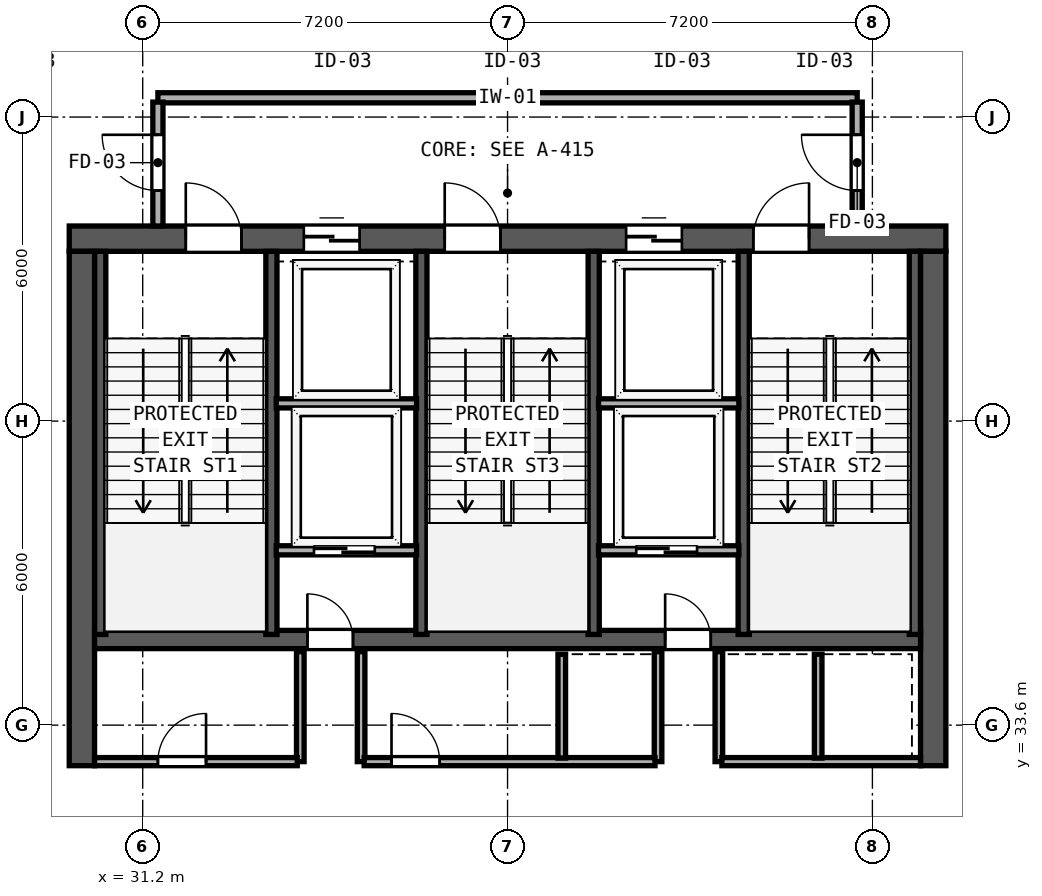
"""IFC4 building model, lengths in metres.
Left out: names, types, materials, properties, quantities, classifications, styles, units other than length and angle.
Written with IfcOpenShell. Run it as: python <this file> out.ifc"""

import sys

from ifc_helpers import new_model, si_unit, direction, frame, frame_2d, origin, place, context, subcontext, project, spatial, rectangle, extrude, element, fill, save


model = new_model("IFC4")
c1 = context("Model", 3, precision=1e-05, world=origin(), true_north=direction((0.0, 1.0)))
c2 = subcontext(c1, "Body", "Model", "MODEL_VIEW")
j1 = project(units=[si_unit("LENGTHUNIT", "METRE"), si_unit("PLANEANGLEUNIT", "RADIAN")], contexts=[c1])
p1 = place(None, origin())
s1 = spatial("IfcSite", under=j1, at=p1, CompositionType="ELEMENT")
p2 = place(p1, origin())
s2 = spatial("IfcBuilding", under=s1, at=p2, CompositionType="ELEMENT")
p3 = place(p2, frame((0.0, 0.0, 313.4)))
s3 = spatial("IfcBuildingStorey", under=s2, at=p3, CompositionType="ELEMENT", Elevation=313.4)
p4 = place(p3, frame((29.75, 43.2, 0.0), z_axis=(0.0, 0.0, 1.0), x_axis=(1.0, 0.0, 0.0)))
e1 = element("IfcWall", 1, at=p4, inside=s3, PredefinedType="SHEAR", context=c2, shape_type="SweptSolid", body=[
    extrude(rectangle(XDim=17.3, YDim=0.5, at=frame_2d((8.65, 0.0))), origin(), (0.0, 0.0, 1.0), 4.56),
])
p5 = place(p4, frame((2.3, 0.0, 0.0)))
e2 = element("IfcOpeningElement", 2, at=p5, cuts=e1, PredefinedType="OPENING", context=c2, shape_type="SweptSolid", body=[
    extrude(rectangle(XDim=1.1, YDim=2.15, at=frame_2d((0.55, 1.075))), frame((0.0, 0.26, 0.0), z_axis=(0.0, -1.0, 0.0), x_axis=(1.0, 0.0, 0.0)), (0.0, 0.0, 1.0), 0.52),
])
p6 = place(p4, frame((7.41, 0.0, 0.0)))
e3 = element("IfcOpeningElement", 3, at=p6, cuts=e1, PredefinedType="OPENING", context=c2, shape_type="SweptSolid", body=[
    extrude(rectangle(XDim=1.1, YDim=2.15, at=frame_2d((0.55, 1.075))), frame((0.0, 0.26, 0.0), z_axis=(0.0, -1.0, 0.0), x_axis=(1.0, 0.0, 0.0)), (0.0, 0.0, 1.0), 0.52),
])
p7 = place(p4, frame((13.5, 0.0, 0.0)))
e4 = element("IfcOpeningElement", 4, at=p7, cuts=e1, PredefinedType="OPENING", context=c2, shape_type="SweptSolid", body=[
    extrude(rectangle(XDim=1.1, YDim=2.15, at=frame_2d((0.55, 1.075))), frame((0.0, 0.26, 0.0), z_axis=(0.0, -1.0, 0.0), x_axis=(1.0, 0.0, 0.0)), (0.0, 0.0, 1.0), 0.52),
])
p8 = place(p4, frame((4.63, 0.0, 0.0)))
e5 = element("IfcOpeningElement", 5, at=p8, cuts=e1, PredefinedType="OPENING", context=c2, shape_type="SweptSolid", body=[
    extrude(rectangle(XDim=1.1, YDim=2.2, at=frame_2d((0.55, 1.1))), frame((0.0, 0.26, 0.0), z_axis=(0.0, -1.0, 0.0), x_axis=(1.0, 0.0, 0.0)), (0.0, 0.0, 1.0), 0.52),
])
p9 = place(p4, frame((10.99, 0.0, 0.0)))
e6 = element("IfcOpeningElement", 6, at=p9, cuts=e1, PredefinedType="OPENING", context=c2, shape_type="SweptSolid", body=[
    extrude(rectangle(XDim=1.1, YDim=2.2, at=frame_2d((0.55, 1.1))), frame((0.0, 0.26, 0.0), z_axis=(0.0, -1.0, 0.0), x_axis=(1.0, 0.0, 0.0)), (0.0, 0.0, 1.0), 0.52),
])
for number, where, z_axis, x_axis in (
    (7, (30.0, 32.8, 0.0), (0.0, 0.0, 1.0), (0.0, 1.0, 0.0)),
    (8, (46.8, 32.8, 0.0), (0.0, 0.0, 1.0), (0.0, 1.0, 0.0)),
):
    element("IfcWall", number, at=place(p3, frame(where, z_axis=z_axis, x_axis=x_axis)), inside=s3, PredefinedType="SHEAR", context=c2, shape_type="SweptSolid", body=[
        extrude(rectangle(XDim=10.15, YDim=0.5, at=frame_2d((5.075, 0.0))), origin(), (0.0, 0.0, 1.0), 4.56),
    ])
p10 = place(p3, frame((30.25, 35.29, 0.0), z_axis=(0.0, 0.0, 1.0), x_axis=(1.0, 0.0, 0.0)))
e9 = element("IfcWall", 9, at=p10, inside=s3, PredefinedType="SHEAR", context=c2, shape_type="SweptSolid", body=[
    extrude(rectangle(XDim=16.3, YDim=0.36, at=frame_2d((8.15, 0.0))), origin(), (0.0, 0.0, 1.0), 4.56),
])
p11 = place(p10, frame((5.1, 0.0, 0.0), z_axis=(0.0, 0.0, 1.0), x_axis=(-1.0, 0.0, 0.0)))
e10 = element("IfcOpeningElement", 10, at=p11, cuts=e9, PredefinedType="OPENING", context=c2, shape_type="SweptSolid", body=[
    extrude(rectangle(XDim=0.9, YDim=2.1, at=frame_2d((0.45, 1.05))), frame((0.0, 0.19, 0.0), z_axis=(0.0, -1.0, 0.0), x_axis=(1.0, 0.0, 0.0)), (0.0, 0.0, 1.0), 0.38),
])
p12 = place(p10, frame((12.16, 0.0, 0.0), z_axis=(0.0, 0.0, 1.0), x_axis=(-1.0, 0.0, 0.0)))
e11 = element("IfcOpeningElement", 11, at=p12, cuts=e9, PredefinedType="OPENING", context=c2, shape_type="SweptSolid", body=[
    extrude(rectangle(XDim=0.9, YDim=2.1, at=frame_2d((0.45, 1.05))), frame((0.0, 0.19, 0.0), z_axis=(0.0, -1.0, 0.0), x_axis=(1.0, 0.0, 0.0)), (0.0, 0.0, 1.0), 0.38),
])
for number, where, z_axis, x_axis in (
    (12, (30.362, 35.39, 0.0), (0.0, 0.0, 1.0), (0.0, 1.0, 0.0)),
    (13, (33.74, 35.39, 0.0), (0.0, 0.0, 1.0), (0.0, 1.0, 0.0)),
    (14, (36.7, 35.39, 0.0), (0.0, 0.0, 1.0), (0.0, 1.0, 0.0)),
    (15, (40.1, 35.39, 0.0), (0.0, 0.0, 1.0), (0.0, 1.0, 0.0)),
    (16, (43.06, 35.39, 0.0), (0.0, 0.0, 1.0), (0.0, 1.0, 0.0)),
    (17, (46.438, 35.39, 0.0), (0.0, 0.0, 1.0), (0.0, 1.0, 0.0)),
):
    element("IfcWall", number, at=place(p3, frame(where, z_axis=z_axis, x_axis=x_axis)), inside=s3, PredefinedType="SHEAR", context=c2, shape_type="SweptSolid", body=[
        extrude(rectangle(XDim=7.56, YDim=0.22, at=frame_2d((3.78, 0.0))), origin(), (0.0, 0.0, 1.0), 4.56),
    ])
p13 = place(p3, frame((31.5, 45.98, 0.0), z_axis=(0.0, 0.0, 1.0), x_axis=(1.0, 0.0, 0.0)))
e18 = element("IfcWall", 18, at=p13, inside=s3, PredefinedType="SOLIDWALL", context=c2, shape_type="SweptSolid", body=[
    extrude(rectangle(XDim=13.8, YDim=0.2, at=frame_2d((6.9, 0.0))), origin(), (0.0, 0.0, 1.0), 4.56),
])
p14 = place(p3, frame((31.5, 43.45, 0.0), z_axis=(0.0, 0.0, 1.0), x_axis=(0.0, 1.0, 0.0)))
e19 = element("IfcWall", 19, at=p14, inside=s3, PredefinedType="SOLIDWALL", context=c2, shape_type="SweptSolid", body=[
    extrude(rectangle(XDim=2.445, YDim=0.2, at=frame_2d((1.223, 0.0))), origin(), (0.0, 0.0, 1.0), 4.56),
])
p15 = place(p14, frame((1.8, 0.0, 0.0), z_axis=(0.0, 0.0, 1.0), x_axis=(-1.0, 0.0, 0.0)))
e20 = element("IfcOpeningElement", 20, at=p15, cuts=e19, PredefinedType="OPENING", context=c2, shape_type="SweptSolid", body=[
    extrude(rectangle(XDim=1.1, YDim=2.15, at=frame_2d((0.55, 1.075))), frame((0.0, 0.11, 0.0), z_axis=(0.0, -1.0, 0.0), x_axis=(1.0, 0.0, 0.0)), (0.0, 0.0, 1.0), 0.22),
])
p16 = place(p3, frame((45.3, 43.45, 0.0), z_axis=(0.0, 0.0, 1.0), x_axis=(0.0, 1.0, 0.0)))
e21 = element("IfcWall", 21, at=p16, inside=s3, PredefinedType="SOLIDWALL", context=c2, shape_type="SweptSolid", body=[
    extrude(rectangle(XDim=2.445, YDim=0.2, at=frame_2d((1.223, 0.0))), origin(), (0.0, 0.0, 1.0), 4.56),
])
p17 = place(p16, frame((0.7, 0.0, 0.0)))
e22 = element("IfcOpeningElement", 22, at=p17, cuts=e21, PredefinedType="OPENING", context=c2, shape_type="SweptSolid", body=[
    extrude(rectangle(XDim=1.1, YDim=2.15, at=frame_2d((0.55, 1.075))), frame((0.0, 0.11, 0.0), z_axis=(0.0, -1.0, 0.0), x_axis=(1.0, 0.0, 0.0)), (0.0, 0.0, 1.0), 0.22),
])
for number, where, z_axis, x_axis in (
    (23, (33.835, 39.95, 0.0), (0.0, 0.0, 1.0), (1.0, 0.0, 0.0)),
    (24, (40.195, 39.95, 0.0), (0.0, 0.0, 1.0), (1.0, 0.0, 0.0)),
):
    element("IfcWall", number, at=place(p3, frame(where, z_axis=z_axis, x_axis=x_axis)), inside=s3, PredefinedType="SOLIDWALL", context=c2, shape_type="SweptSolid", body=[
        extrude(rectangle(XDim=2.77, YDim=0.18, at=frame_2d((1.385, 0.0))), origin(), (0.0, 0.0, 1.0), 4.56),
    ])
p18 = place(p3, frame((33.835, 37.05, 0.0), z_axis=(0.0, 0.0, 1.0), x_axis=(1.0, 0.0, 0.0)))
e25 = element("IfcWall", 25, at=p18, inside=s3, PredefinedType="SOLIDWALL", context=c2, shape_type="SweptSolid", body=[
    extrude(rectangle(XDim=2.77, YDim=0.18, at=frame_2d((1.385, 0.0))), origin(), (0.0, 0.0, 1.0), 4.56),
])
p19 = place(p18, frame((1.945, 0.0, 0.0), z_axis=(0.0, 0.0, 1.0), x_axis=(-1.0, 0.0, 0.0)))
e26 = element("IfcOpeningElement", 26, at=p19, cuts=e25, PredefinedType="OPENING", context=c2, shape_type="SweptSolid", body=[
    extrude(rectangle(XDim=1.2, YDim=2.2, at=frame_2d((0.6, 1.1))), frame((0.0, 0.1, 0.0), z_axis=(0.0, -1.0, 0.0), x_axis=(1.0, 0.0, 0.0)), (0.0, 0.0, 1.0), 0.2),
])
for number, where, z_axis, x_axis in (
    (27, (34.31, 32.88, 0.0), (0.0, 0.0, 1.0), (0.0, 1.0, 0.0)),
    (28, (35.51, 32.88, 0.0), (0.0, 0.0, 1.0), (0.0, 1.0, 0.0)),
):
    element("IfcWall", number, at=place(p3, frame(where, z_axis=z_axis, x_axis=x_axis)), inside=s3, PredefinedType="SOLIDWALL", context=c2, shape_type="SweptSolid", body=[
        extrude(rectangle(XDim=2.17, YDim=0.15, at=frame_2d((1.085, 0.0))), origin(), (0.0, 0.0, 1.0), 4.56),
    ])
p20 = place(p3, frame((40.195, 37.05, 0.0), z_axis=(0.0, 0.0, 1.0), x_axis=(1.0, 0.0, 0.0)))
e29 = element("IfcWall", 29, at=p20, inside=s3, PredefinedType="SOLIDWALL", context=c2, shape_type="SweptSolid", body=[
    extrude(rectangle(XDim=2.77, YDim=0.18, at=frame_2d((1.385, 0.0))), origin(), (0.0, 0.0, 1.0), 4.56),
])
p21 = place(p20, frame((1.945, 0.0, 0.0), z_axis=(0.0, 0.0, 1.0), x_axis=(-1.0, 0.0, 0.0)))
e30 = element("IfcOpeningElement", 30, at=p21, cuts=e29, PredefinedType="OPENING", context=c2, shape_type="SweptSolid", body=[
    extrude(rectangle(XDim=1.2, YDim=2.2, at=frame_2d((0.6, 1.1))), frame((0.0, 0.1, 0.0), z_axis=(0.0, -1.0, 0.0), x_axis=(1.0, 0.0, 0.0)), (0.0, 0.0, 1.0), 0.2),
])
for number, where, z_axis, x_axis in (
    (31, (41.37, 32.88, 0.0), (0.0, 0.0, 1.0), (0.0, 1.0, 0.0)),
    (32, (42.57, 32.88, 0.0), (0.0, 0.0, 1.0), (0.0, 1.0, 0.0)),
):
    element("IfcWall", number, at=place(p3, frame(where, z_axis=z_axis, x_axis=x_axis)), inside=s3, PredefinedType="SOLIDWALL", context=c2, shape_type="SweptSolid", body=[
        extrude(rectangle(XDim=2.17, YDim=0.15, at=frame_2d((1.085, 0.0))), origin(), (0.0, 0.0, 1.0), 4.56),
    ])
p22 = place(p3, frame((30.25, 32.88, 0.0), z_axis=(0.0, 0.0, 1.0), x_axis=(1.0, 0.0, 0.0)))
e33 = element("IfcWall", 33, at=p22, inside=s3, PredefinedType="SOLIDWALL", context=c2, shape_type="SweptSolid", body=[
    extrude(rectangle(XDim=4.0, YDim=0.16, at=frame_2d((2.0, 0.0))), origin(), (0.0, 0.0, 1.0), 4.56),
])
p23 = place(p22, frame((2.2, 0.0, 0.0), z_axis=(0.0, 0.0, 1.0), x_axis=(-1.0, 0.0, 0.0)))
e34 = element("IfcOpeningElement", 34, at=p23, cuts=e33, PredefinedType="OPENING", context=c2, shape_type="SweptSolid", body=[
    extrude(rectangle(XDim=0.95, YDim=2.12, at=frame_2d((0.475, 1.06))), frame((0.0, 0.09, 0.0), z_axis=(0.0, -1.0, 0.0), x_axis=(1.0, 0.0, 0.0)), (0.0, 0.0, 1.0), 0.18),
])
p24 = place(p3, frame((35.57, 32.88, 0.0), z_axis=(0.0, 0.0, 1.0), x_axis=(1.0, 0.0, 0.0)))
e35 = element("IfcWall", 35, at=p24, inside=s3, PredefinedType="SOLIDWALL", context=c2, shape_type="SweptSolid", body=[
    extrude(rectangle(XDim=5.74, YDim=0.16, at=frame_2d((2.87, 0.0))), origin(), (0.0, 0.0, 1.0), 4.56),
])
p25 = place(p24, frame((1.49, 0.0, 0.0), z_axis=(0.0, 0.0, 1.0), x_axis=(-1.0, 0.0, 0.0)))
e36 = element("IfcOpeningElement", 36, at=p25, cuts=e35, PredefinedType="OPENING", context=c2, shape_type="SweptSolid", body=[
    extrude(rectangle(XDim=0.95, YDim=2.12, at=frame_2d((0.475, 1.06))), frame((0.0, 0.09, 0.0), z_axis=(0.0, -1.0, 0.0), x_axis=(1.0, 0.0, 0.0)), (0.0, 0.0, 1.0), 0.18),
])
p26 = place(p3, frame((42.63, 32.88, 0.0), z_axis=(0.0, 0.0, 1.0), x_axis=(1.0, 0.0, 0.0)))
e37 = element("IfcWall", 37, at=p26, inside=s3, PredefinedType="SOLIDWALL", context=c2, shape_type="SweptSolid", body=[
    extrude(rectangle(XDim=3.92, YDim=0.16, at=frame_2d((1.96, 0.0))), origin(), (0.0, 0.0, 1.0), 4.56),
])
for number, where, z_axis, x_axis in (
    (38, (39.47, 32.95, 0.0), (0.0, 0.0, 1.0), (0.0, 1.0, 0.0)),
    (39, (44.53, 32.95, 0.0), (0.0, 0.0, 1.0), (0.0, 1.0, 0.0)),
):
    element("IfcWall", number, at=place(p3, frame(where, z_axis=z_axis, x_axis=x_axis)), inside=s3, PredefinedType="SOLIDWALL", context=c2, shape_type="SweptSolid", body=[
        extrude(rectangle(XDim=2.05, YDim=0.15, at=frame_2d((1.025, 0.0))), origin(), (0.0, 0.0, 1.0), 4.56),
    ])
p27 = place(p5, origin())
e40 = element("IfcDoor", 40, at=p27, inside=s3, OperationType="SINGLE_SWING_LEFT", PredefinedType="DOOR", context=c2, shape_type="SweptSolid", body=[
    extrude(rectangle(XDim=1.1, YDim=2.15, at=frame_2d((0.55, 1.075))), frame((0.0, 0.185, 0.0), z_axis=(0.0, -1.0, 0.0), x_axis=(1.0, 0.0, 0.0)), (0.0, 0.0, 1.0), 0.05),
])
fill(e2, e40)
p28 = place(p6, origin())
e41 = element("IfcDoor", 41, at=p28, inside=s3, OperationType="SINGLE_SWING_LEFT", PredefinedType="DOOR", context=c2, shape_type="SweptSolid", body=[
    extrude(rectangle(XDim=1.1, YDim=2.15, at=frame_2d((0.55, 1.075))), frame((0.0, 0.185, 0.0), z_axis=(0.0, -1.0, 0.0), x_axis=(1.0, 0.0, 0.0)), (0.0, 0.0, 1.0), 0.05),
])
fill(e3, e41)
p29 = place(p7, origin())
e42 = element("IfcDoor", 42, at=p29, inside=s3, OperationType="SINGLE_SWING_RIGHT", PredefinedType="DOOR", context=c2, shape_type="SweptSolid", body=[
    extrude(rectangle(XDim=1.1, YDim=2.15, at=frame_2d((0.55, 1.075))), frame((0.0, 0.185, 0.0), z_axis=(0.0, -1.0, 0.0), x_axis=(1.0, 0.0, 0.0)), (0.0, 0.0, 1.0), 0.05),
])
fill(e4, e42)
p30 = place(p15, origin())
e43 = element("IfcDoor", 43, at=p30, inside=s3, OperationType="SINGLE_SWING_LEFT", PredefinedType="DOOR", context=c2, shape_type="SweptSolid", body=[
    extrude(rectangle(XDim=1.1, YDim=2.15, at=frame_2d((0.55, 1.075))), frame((0.0, 0.025, 0.0), z_axis=(0.0, -1.0, 0.0), x_axis=(1.0, 0.0, 0.0)), (0.0, 0.0, 1.0), 0.05),
])
fill(e20, e43)
p31 = place(p17, origin())
e44 = element("IfcDoor", 44, at=p31, inside=s3, OperationType="SINGLE_SWING_RIGHT", PredefinedType="DOOR", context=c2, shape_type="SweptSolid", body=[
    extrude(rectangle(XDim=1.1, YDim=2.15, at=frame_2d((0.55, 1.075))), frame((0.0, 0.025, 0.0), z_axis=(0.0, -1.0, 0.0), x_axis=(1.0, 0.0, 0.0)), (0.0, 0.0, 1.0), 0.05),
])
fill(e22, e44)
p32 = place(p8, origin())
e45 = element("IfcDoor", 45, at=p32, inside=s3, OperationType="SLIDING_TO_LEFT", PredefinedType="DOOR", context=c2, shape_type="SweptSolid", body=[
    extrude(rectangle(XDim=1.1, YDim=2.2, at=frame_2d((0.55, 1.1))), frame((0.0, 0.185, 0.0), z_axis=(0.0, -1.0, 0.0), x_axis=(1.0, 0.0, 0.0)), (0.0, 0.0, 1.0), 0.05),
])
fill(e5, e45)
p33 = place(p9, origin())
e46 = element("IfcDoor", 46, at=p33, inside=s3, OperationType="SLIDING_TO_LEFT", PredefinedType="DOOR", context=c2, shape_type="SweptSolid", body=[
    extrude(rectangle(XDim=1.1, YDim=2.2, at=frame_2d((0.55, 1.1))), frame((0.0, 0.185, 0.0), z_axis=(0.0, -1.0, 0.0), x_axis=(1.0, 0.0, 0.0)), (0.0, 0.0, 1.0), 0.05),
])
fill(e6, e46)
p34 = place(p19, origin())
e47 = element("IfcDoor", 47, at=p34, inside=s3, OperationType="SLIDING_TO_RIGHT", PredefinedType="DOOR", context=c2, shape_type="SweptSolid", body=[
    extrude(rectangle(XDim=1.2, YDim=2.2, at=frame_2d((0.6, 1.1))), frame((0.0, 0.025, 0.0), z_axis=(0.0, -1.0, 0.0), x_axis=(1.0, 0.0, 0.0)), (0.0, 0.0, 1.0), 0.05),
])
fill(e26, e47)
p35 = place(p11, origin())
e48 = element("IfcDoor", 48, at=p35, inside=s3, OperationType="SINGLE_SWING_RIGHT", PredefinedType="DOOR", context=c2, shape_type="SweptSolid", body=[
    extrude(rectangle(XDim=0.9, YDim=2.1, at=frame_2d((0.45, 1.05))), frame((0.0, 0.025, 0.0), z_axis=(0.0, -1.0, 0.0), x_axis=(1.0, 0.0, 0.0)), (0.0, 0.0, 1.0), 0.05),
])
fill(e10, e48)
p36 = place(p21, origin())
e49 = element("IfcDoor", 49, at=p36, inside=s3, OperationType="SLIDING_TO_RIGHT", PredefinedType="DOOR", context=c2, shape_type="SweptSolid", body=[
    extrude(rectangle(XDim=1.2, YDim=2.2, at=frame_2d((0.6, 1.1))), frame((0.0, 0.025, 0.0), z_axis=(0.0, -1.0, 0.0), x_axis=(1.0, 0.0, 0.0)), (0.0, 0.0, 1.0), 0.05),
])
fill(e30, e49)
p37 = place(p12, origin())
e50 = element("IfcDoor", 50, at=p37, inside=s3, OperationType="SINGLE_SWING_RIGHT", PredefinedType="DOOR", context=c2, shape_type="SweptSolid", body=[
    extrude(rectangle(XDim=0.9, YDim=2.1, at=frame_2d((0.45, 1.05))), frame((0.0, 0.025, 0.0), z_axis=(0.0, -1.0, 0.0), x_axis=(1.0, 0.0, 0.0)), (0.0, 0.0, 1.0), 0.05),
])
fill(e11, e50)
p38 = place(p23, origin())
e51 = element("IfcDoor", 51, at=p38, inside=s3, OperationType="SINGLE_SWING_LEFT", PredefinedType="DOOR", context=c2, shape_type="SweptSolid", body=[
    extrude(rectangle(XDim=0.95, YDim=2.12, at=frame_2d((0.475, 1.06))), frame((0.0, 0.025, 0.0), z_axis=(0.0, -1.0, 0.0), x_axis=(1.0, 0.0, 0.0)), (0.0, 0.0, 1.0), 0.05),
])
fill(e34, e51)
p39 = place(p25, origin())
e52 = element("IfcDoor", 52, at=p39, inside=s3, OperationType="SINGLE_SWING_RIGHT", PredefinedType="DOOR", context=c2, shape_type="SweptSolid", body=[
    extrude(rectangle(XDim=0.95, YDim=2.12, at=frame_2d((0.475, 1.06))), frame((0.0, 0.025, 0.0), z_axis=(0.0, -1.0, 0.0), x_axis=(1.0, 0.0, 0.0)), (0.0, 0.0, 1.0), 0.05),
])
fill(e36, e52)
save(model, sys.argv[1])
